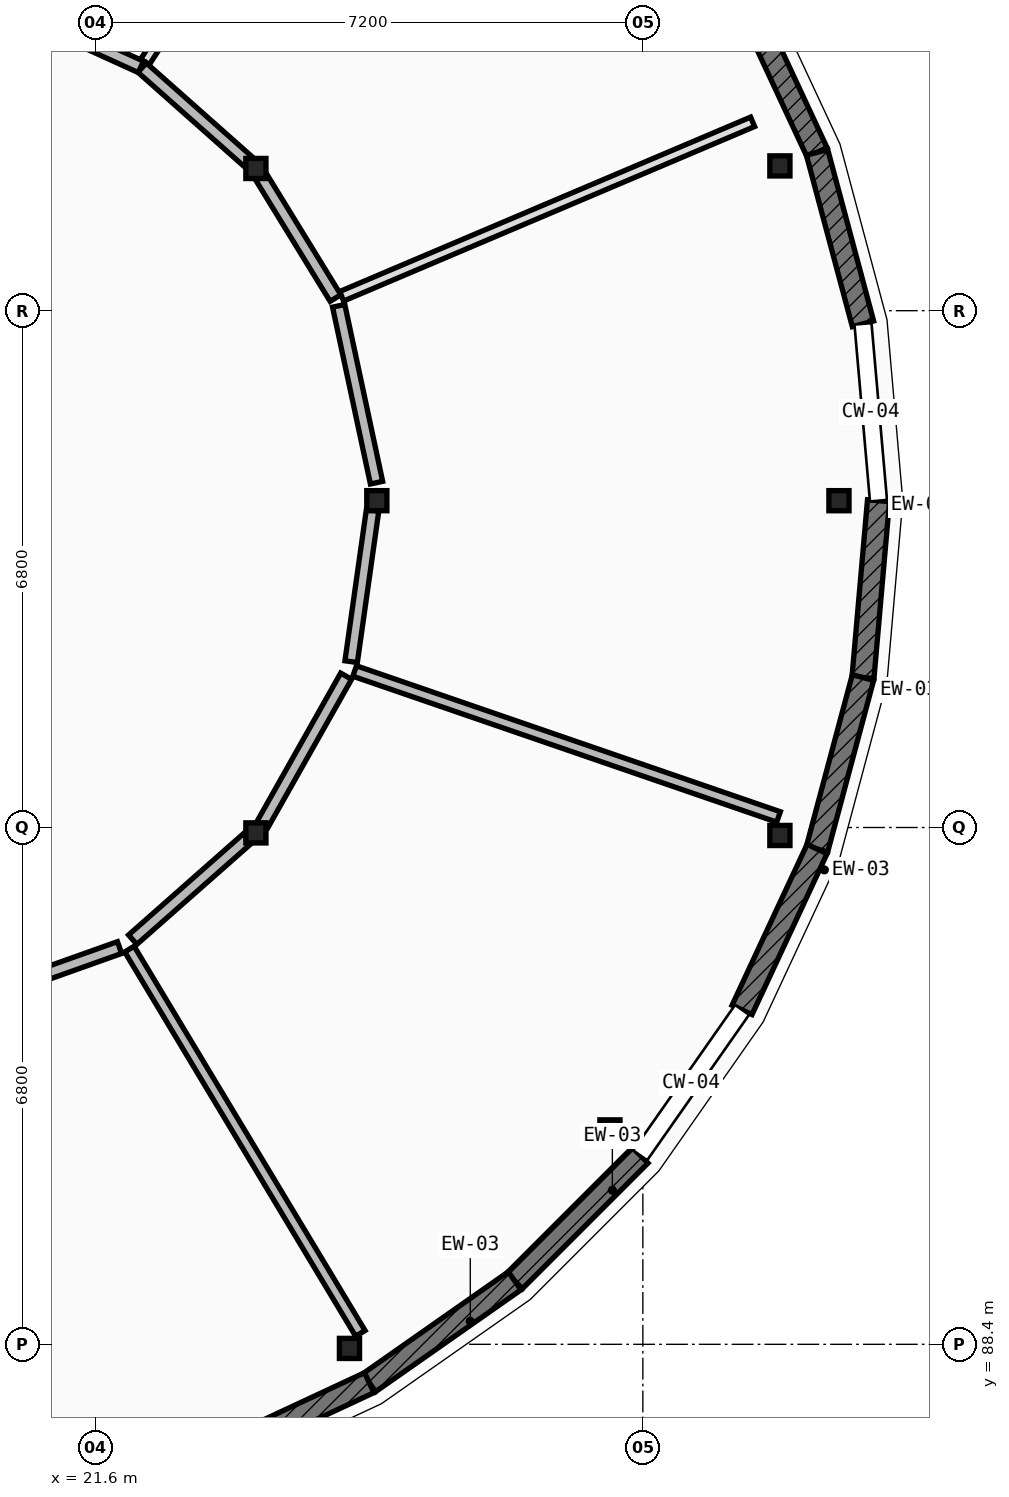
"""IFC4 building model, lengths in metres.
Left out: names, types, materials, properties, quantities, classifications, styles, units other than length and angle.
Written with IfcOpenShell. Run it as: python <this file> out.ifc"""

import sys

from ifc_helpers import new_model, si_unit, direction, frame, frame_2d, origin, origin_2d, place, context, subcontext, project, spatial, rectangle, extrude, element, fill, save


model = new_model("IFC4")
c1 = context("Model", 3, precision=1e-05, world=origin(), true_north=direction((0.0, 1.0)))
c2 = subcontext(c1, "Body", "Model", "MODEL_VIEW")
j1 = project(units=[si_unit("LENGTHUNIT", "METRE"), si_unit("PLANEANGLEUNIT", "RADIAN")], contexts=[c1])
p1 = place(None, origin())
s1 = spatial("IfcSite", under=j1, at=p1, CompositionType="ELEMENT")
p2 = place(p1, origin())
s2 = spatial("IfcBuilding", under=s1, at=p2, CompositionType="ELEMENT")
p3 = place(p2, frame((0.0, 0.0, 17.15)))
s3 = spatial("IfcBuildingStorey", under=s2, at=p3, CompositionType="ELEMENT", Elevation=17.15)
for number, where, z_axis, x_axis in (
    (1, (31.38, 99.5, 0.0), (0.0, 0.0, 1.0), (1.0, 0.0, 0.0)),
    (2, (30.603, 103.905, 0.0), (0.0, 0.0, 1.0), (1.0, 0.0, 0.0)),
    (3, (24.94, 88.346, 0.0), (0.0, 0.0, 1.0), (1.0, 0.0, 0.0)),
    (4, (28.367, 91.221, 0.0), (0.0, 0.0, 1.0), (1.0, 0.0, 0.0)),
    (5, (30.603, 95.095, 0.0), (0.0, 0.0, 1.0), (1.0, 0.0, 0.0)),
    (6, (25.3, 99.5, 0.0), (0.0, 0.0, 1.0), (1.0, 0.0, 0.0)),
    (7, (23.709, 103.871, 0.0), (0.0, 0.0, 1.0), (1.0, 0.0, 0.0)),
    (8, (23.709, 95.129, 0.0), (0.0, 0.0, 1.0), (1.0, 0.0, 0.0)),
):
    element("IfcColumn", number, at=place(p3, frame(where, z_axis=z_axis, x_axis=x_axis)), inside=s3, PredefinedType="COLUMN", context=c2, shape_type="SweptSolid", body=[
        extrude(rectangle(XDim=0.265, YDim=0.265, at=origin_2d()), origin(), (0.0, 0.0, 1.0), 4.2),
    ])
p4 = place(p3, frame((31.9, 99.5, 0.0), z_axis=(0.0, 0.0, 1.0), x_axis=(-0.087274565792, -0.996184295282, 0.0)))
e9 = element("IfcWall", 9, at=p4, inside=s3, PredefinedType="ELEMENTEDWALL", context=c2, shape_type="SweptSolid", body=[
    extrude(rectangle(XDim=2.336, YDim=0.29, at=frame_2d((1.168, 0.0))), origin(), (0.0, 0.0, 1.0), 3.369),
])
p5 = place(p4, frame((0.568, 0.0, 0.85)))
e10 = element("IfcOpeningElement", 10, at=p5, cuts=e9, PredefinedType="OPENING", context=c2, shape_type="SweptSolid", body=[
    extrude(rectangle(XDim=1.2, YDim=2.25, at=frame_2d((0.6, 1.125))), frame((0.0, 0.155, 0.0), z_axis=(0.0, -1.0, 0.0), x_axis=(1.0, 0.0, 0.0)), (0.0, 0.0, 1.0), 0.31),
])
p6 = place(p3, frame((31.696, 97.173, 0.0), z_axis=(0.0, 0.0, 1.0), x_axis=(-0.258612423585, -0.965981166673, 0.0)))
e11 = element("IfcWall", 11, at=p6, inside=s3, PredefinedType="ELEMENTEDWALL", context=c2, shape_type="SweptSolid", body=[
    extrude(rectangle(XDim=2.335, YDim=0.29, at=frame_2d((1.168, 0.0))), origin(), (0.0, 0.0, 1.0), 3.369),
])
p7 = place(p6, frame((0.558, 0.0, 0.85)))
e12 = element("IfcOpeningElement", 12, at=p7, cuts=e11, PredefinedType="OPENING", context=c2, shape_type="SweptSolid", body=[
    extrude(rectangle(XDim=1.22, YDim=1.5, at=frame_2d((0.61, 0.75))), frame((0.0, 0.155, 0.0), z_axis=(0.0, -1.0, 0.0), x_axis=(1.0, 0.0, 0.0)), (0.0, 0.0, 1.0), 0.31),
])
p8 = place(p3, frame((31.092, 94.917, 0.0), z_axis=(0.0, 0.0, 1.0), x_axis=(-0.422587894318, -0.906321946979, 0.0)))
e13 = element("IfcWall", 13, at=p8, inside=s3, PredefinedType="ELEMENTEDWALL", context=c2, shape_type="SweptSolid", body=[
    extrude(rectangle(XDim=2.336, YDim=0.29, at=frame_2d((1.168, 0.0))), origin(), (0.0, 0.0, 1.0), 3.369),
])
p9 = place(p8, frame((0.558, 0.0, 0.85)))
e14 = element("IfcOpeningElement", 14, at=p9, cuts=e13, PredefinedType="OPENING", context=c2, shape_type="SweptSolid", body=[
    extrude(rectangle(XDim=1.22, YDim=1.8, at=frame_2d((0.61, 0.9))), frame((0.0, 0.155, 0.0), z_axis=(0.0, -1.0, 0.0), x_axis=(1.0, 0.0, 0.0)), (0.0, 0.0, 1.0), 0.31),
])
p10 = place(p3, frame((28.765, 90.887, 0.0), z_axis=(0.0, 0.0, 1.0), x_axis=(-0.707106781187, -0.707106781187, 0.0)))
e15 = element("IfcWall", 15, at=p10, inside=s3, PredefinedType="ELEMENTEDWALL", context=c2, shape_type="SweptSolid", body=[
    extrude(rectangle(XDim=2.336, YDim=0.29, at=frame_2d((1.168, 0.0))), origin(), (0.0, 0.0, 1.0), 3.369),
])
p11 = place(p10, frame((0.543, 0.0, 0.85)))
e16 = element("IfcOpeningElement", 16, at=p11, cuts=e15, PredefinedType="OPENING", context=c2, shape_type="SweptSolid", body=[
    extrude(rectangle(XDim=1.25, YDim=1.5, at=frame_2d((0.625, 0.75))), frame((0.0, 0.155, 0.0), z_axis=(0.0, -1.0, 0.0), x_axis=(1.0, 0.0, 0.0)), (0.0, 0.0, 1.0), 0.31),
])
p12 = place(p3, frame((27.113, 89.235, 0.0), z_axis=(0.0, 0.0, 1.0), x_axis=(-0.819045278347, -0.573728883722, 0.0)))
e17 = element("IfcWall", 17, at=p12, inside=s3, PredefinedType="ELEMENTEDWALL", context=c2, shape_type="SweptSolid", body=[
    extrude(rectangle(XDim=2.336, YDim=0.29, at=frame_2d((1.168, 0.0))), origin(), (0.0, 0.0, 1.0), 3.369),
])
p13 = place(p12, frame((0.543, 0.0, 0.85)))
e18 = element("IfcOpeningElement", 18, at=p13, cuts=e17, PredefinedType="OPENING", context=c2, shape_type="SweptSolid", body=[
    extrude(rectangle(XDim=1.25, YDim=1.8, at=frame_2d((0.625, 0.9))), frame((0.0, 0.155, 0.0), z_axis=(0.0, -1.0, 0.0), x_axis=(1.0, 0.0, 0.0)), (0.0, 0.0, 1.0), 0.31),
])
p14 = place(p3, frame((25.2, 87.895, 0.0), z_axis=(0.0, 0.0, 1.0), x_axis=(-0.906321946979, -0.422587894318, 0.0)))
e19 = element("IfcWall", 19, at=p14, inside=s3, PredefinedType="ELEMENTEDWALL", context=c2, shape_type="SweptSolid", body=[
    extrude(rectangle(XDim=2.336, YDim=0.29, at=frame_2d((1.168, 0.0))), origin(), (0.0, 0.0, 1.0), 3.369),
])
p15 = place(p14, frame((0.543, 0.0, 0.85)))
e20 = element("IfcOpeningElement", 20, at=p15, cuts=e19, PredefinedType="OPENING", context=c2, shape_type="SweptSolid", body=[
    extrude(rectangle(XDim=1.25, YDim=2.1, at=frame_2d((0.625, 1.05))), frame((0.0, 0.155, 0.0), z_axis=(0.0, -1.0, 0.0), x_axis=(1.0, 0.0, 0.0)), (0.0, 0.0, 1.0), 0.31),
])
p16 = place(p3, frame((30.105, 106.2, 0.0), z_axis=(0.0, 0.0, 1.0), x_axis=(0.422587894318, -0.906321946979, 0.0)))
e21 = element("IfcWall", 21, at=p16, inside=s3, PredefinedType="ELEMENTEDWALL", context=c2, shape_type="SweptSolid", body=[
    extrude(rectangle(XDim=2.336, YDim=0.29, at=frame_2d((1.168, 0.0))), origin(), (0.0, 0.0, 1.0), 3.369),
])
p17 = place(p16, frame((0.443, 0.0, 0.85)))
e22 = element("IfcOpeningElement", 22, at=p17, cuts=e21, PredefinedType="OPENING", context=c2, shape_type="SweptSolid", body=[
    extrude(rectangle(XDim=1.45, YDim=2.05, at=frame_2d((0.725, 1.025))), frame((0.0, 0.155, 0.0), z_axis=(0.0, -1.0, 0.0), x_axis=(1.0, 0.0, 0.0)), (0.0, 0.0, 1.0), 0.31),
])
p18 = place(p3, frame((31.092, 104.083, 0.0), z_axis=(0.0, 0.0, 1.0), x_axis=(0.258612423585, -0.965981166673, 0.0)))
e23 = element("IfcWall", 23, at=p18, inside=s3, PredefinedType="ELEMENTEDWALL", context=c2, shape_type="SweptSolid", body=[
    extrude(rectangle(XDim=2.335, YDim=0.29, at=frame_2d((1.168, 0.0))), origin(), (0.0, 0.0, 1.0), 3.369),
])
p19 = place(p18, frame((0.418, 0.0, 0.85)))
e24 = element("IfcOpeningElement", 24, at=p19, cuts=e23, PredefinedType="OPENING", context=c2, shape_type="SweptSolid", body=[
    extrude(rectangle(XDim=1.5, YDim=1.3, at=frame_2d((0.75, 0.65))), frame((0.0, 0.155, 0.0), z_axis=(0.0, -1.0, 0.0), x_axis=(1.0, 0.0, 0.0)), (0.0, 0.0, 1.0), 0.31),
])
p20 = place(p3, frame((22.045, 93.6, 0.0), z_axis=(0.0, 0.0, 1.0), x_axis=(0.515043444679, -0.857164074197, 0.0)))
e25 = element("IfcWall", 25, at=p20, inside=s3, PredefinedType="PARTITIONING", context=c2, shape_type="SweptSolid", body=[
    extrude(rectangle(XDim=5.899, YDim=0.145, at=frame_2d((2.949, 0.0))), origin(), (0.0, 0.0, 1.0), 3.344),
])
p21 = place(p3, frame((25.008, 97.259, 0.0), z_axis=(0.0, 0.0, 1.0), x_axis=(0.945537377012, -0.325513546068, 0.0)))
e26 = element("IfcWall", 26, at=p21, inside=s3, PredefinedType="PARTITIONING", context=c2, shape_type="SweptSolid", body=[
    extrude(rectangle(XDim=5.898, YDim=0.145, at=frame_2d((2.949, 0.0))), origin(), (0.0, 0.0, 1.0), 3.344),
])
p22 = place(p3, frame((24.836, 102.189, 0.0), z_axis=(0.0, 0.0, 1.0), x_axis=(0.920468107404, 0.390817685438, 0.0)))
e27 = element("IfcWall", 27, at=p22, inside=s3, PredefinedType="PLUMBINGWALL", context=c2, shape_type="SweptSolid", body=[
    extrude(rectangle(XDim=5.875, YDim=0.135, at=frame_2d((2.938, 0.0))), origin(), (0.0, 0.0, 1.0), 3.344),
])
p23 = place(p3, frame((22.249, 105.273, 0.0), z_axis=(0.0, 0.0, 1.0), x_axis=(0.544677189284, 0.838645789039, 0.0)))
e28 = element("IfcWall", 28, at=p23, inside=s3, PredefinedType="PLUMBINGWALL", context=c2, shape_type="SweptSolid", body=[
    extrude(rectangle(XDim=5.875, YDim=0.135, at=frame_2d((2.938, 0.0))), origin(), (0.0, 0.0, 1.0), 3.344),
])
p24 = place(p3, frame((19.802, 92.868, 0.0), z_axis=(0.0, 0.0, 1.0), x_axis=(0.942088643155, 0.335363964132, 0.0)))
e29 = element("IfcWall", 29, at=p24, inside=s3, PredefinedType="PARTITIONING", context=c2, shape_type="SweptSolid", body=[
    extrude(rectangle(XDim=2.243, YDim=0.165, at=frame_2d((1.122, 0.0))), origin(), (0.0, 0.0, 1.0), 3.344),
])
p25 = place(p3, frame((22.088, 93.724, 0.0), z_axis=(0.0, 0.0, 1.0), x_axis=(0.750064751016, 0.66136439977, 0.0)))
e30 = element("IfcWall", 30, at=p25, inside=s3, PredefinedType="PARTITIONING", context=c2, shape_type="SweptSolid", body=[
    extrude(rectangle(XDim=2.009, YDim=0.165, at=frame_2d((1.005, 0.0))), origin(), (0.0, 0.0, 1.0), 3.344),
])
p26 = place(p25, frame((0.424, 0.0, 0.0)))
e31 = element("IfcOpeningElement", 31, at=p26, cuts=e30, PredefinedType="OPENING", context=c2, shape_type="SweptSolid", body=[
    extrude(rectangle(XDim=1.16, YDim=2.18, at=frame_2d((0.58, 1.09))), frame((0.0, 0.093, 0.0), z_axis=(0.0, -1.0, 0.0), x_axis=(1.0, 0.0, 0.0)), (0.0, 0.0, 1.0), 0.185),
])
p27 = place(p3, frame((23.794, 95.237, 0.0), z_axis=(0.0, 0.0, 1.0), x_axis=(0.491278846753, 0.87100235059, 0.0)))
e32 = element("IfcWall", 32, at=p27, inside=s3, PredefinedType="PARTITIONING", context=c2, shape_type="SweptSolid", body=[
    extrude(rectangle(XDim=2.243, YDim=0.165, at=frame_2d((1.122, 0.0))), origin(), (0.0, 0.0, 1.0), 3.344),
])
p28 = place(p3, frame((24.962, 97.382, 0.0), z_axis=(0.0, 0.0, 1.0), x_axis=(0.140164013462, 0.990128299429, 0.0)))
e33 = element("IfcWall", 33, at=p28, inside=s3, PredefinedType="PARTITIONING", context=c2, shape_type="SweptSolid", body=[
    extrude(rectangle(XDim=2.012, YDim=0.165, at=frame_2d((1.006, 0.0))), origin(), (0.0, 0.0, 1.0), 3.344),
])
p29 = place(p28, frame((0.396, 0.0, 0.0)))
e34 = element("IfcOpeningElement", 34, at=p29, cuts=e33, PredefinedType="OPENING", context=c2, shape_type="SweptSolid", body=[
    extrude(rectangle(XDim=1.22, YDim=2.18, at=frame_2d((0.61, 1.09))), frame((0.0, 0.093, 0.0), z_axis=(0.0, -1.0, 0.0), x_axis=(1.0, 0.0, 0.0)), (0.0, 0.0, 1.0), 0.185),
])
p30 = place(p3, frame((25.296, 99.737, 0.0), z_axis=(0.0, 0.0, 1.0), x_axis=(-0.209199758456, 0.977872926848, 0.0)))
e35 = element("IfcWall", 35, at=p30, inside=s3, PredefinedType="PARTITIONING", context=c2, shape_type="SweptSolid", body=[
    extrude(rectangle(XDim=2.38, YDim=0.165, at=frame_2d((1.19, 0.0))), origin(), (0.0, 0.0, 1.0), 3.344),
])
p31 = place(p3, frame((24.756, 102.166, 0.0), z_axis=(0.0, 0.0, 1.0), x_axis=(-0.523293079125, 0.852152775821, 0.0)))
e36 = element("IfcWall", 36, at=p31, inside=s3, PredefinedType="PARTITIONING", context=c2, shape_type="SweptSolid", body=[
    extrude(rectangle(XDim=1.863, YDim=0.165, at=frame_2d((0.932, 0.0))), origin(), (0.0, 0.0, 1.0), 3.344),
])
p32 = place(p31, frame((0.482, 0.0, 0.0)))
e37 = element("IfcOpeningElement", 37, at=p32, cuts=e36, PredefinedType="OPENING", context=c2, shape_type="SweptSolid", body=[
    extrude(rectangle(XDim=0.9, YDim=2.1, at=frame_2d((0.45, 1.05))), frame((0.0, 0.093, 0.0), z_axis=(0.0, -1.0, 0.0), x_axis=(1.0, 0.0, 0.0)), (0.0, 0.0, 1.0), 0.185),
])
p33 = place(p3, frame((23.606, 103.962, 0.0), z_axis=(0.0, 0.0, 1.0), x_axis=(-0.748225706364, 0.66344426468, 0.0)))
e38 = element("IfcWall", 38, at=p33, inside=s3, PredefinedType="PARTITIONING", context=c2, shape_type="SweptSolid", body=[
    extrude(rectangle(XDim=1.863, YDim=0.165, at=frame_2d((0.932, 0.0))), origin(), (0.0, 0.0, 1.0), 3.344),
])
p34 = place(p3, frame((22.196, 105.208, 0.0), z_axis=(0.0, 0.0, 1.0), x_axis=(-0.910195152859, 0.414179651495, 0.0)))
e39 = element("IfcWall", 39, at=p34, inside=s3, PredefinedType="PARTITIONING", context=c2, shape_type="SweptSolid", body=[
    extrude(rectangle(XDim=2.002, YDim=0.165, at=frame_2d((1.001, 0.0))), origin(), (0.0, 0.0, 1.0), 3.344),
])
p35 = place(p34, frame((0.53, 0.0, 0.0)))
e40 = element("IfcOpeningElement", 40, at=p35, cuts=e39, PredefinedType="OPENING", context=c2, shape_type="SweptSolid", body=[
    extrude(rectangle(XDim=0.94, YDim=2.1, at=frame_2d((0.47, 1.05))), frame((0.0, 0.093, 0.0), z_axis=(0.0, -1.0, 0.0), x_axis=(1.0, 0.0, 0.0)), (0.0, 0.0, 1.0), 0.185),
])
p36 = place(p5, origin())
e41 = element("IfcWindow", 41, at=p36, inside=s3, PartitioningType="SINGLE_PANEL", PredefinedType="WINDOW", context=c2, shape_type="SweptSolid", body=[
    extrude(rectangle(XDim=1.2, YDim=2.25, at=frame_2d((0.6, 1.125))), frame((0.0, 0.03, 0.0), z_axis=(0.0, -1.0, 0.0), x_axis=(1.0, 0.0, 0.0)), (0.0, 0.0, 1.0), 0.06),
])
fill(e10, e41)
p37 = place(p7, origin())
e42 = element("IfcWindow", 42, at=p37, inside=s3, PartitioningType="SINGLE_PANEL", PredefinedType="WINDOW", context=c2, shape_type="SweptSolid", body=[
    extrude(rectangle(XDim=1.22, YDim=1.5, at=frame_2d((0.61, 0.75))), frame((0.0, 0.03, 0.0), z_axis=(0.0, -1.0, 0.0), x_axis=(1.0, 0.0, 0.0)), (0.0, 0.0, 1.0), 0.06),
])
fill(e12, e42)
p38 = place(p9, origin())
e43 = element("IfcWindow", 43, at=p38, inside=s3, PartitioningType="SINGLE_PANEL", PredefinedType="WINDOW", context=c2, shape_type="SweptSolid", body=[
    extrude(rectangle(XDim=1.22, YDim=1.8, at=frame_2d((0.61, 0.9))), frame((0.0, 0.03, 0.0), z_axis=(0.0, -1.0, 0.0), x_axis=(1.0, 0.0, 0.0)), (0.0, 0.0, 1.0), 0.06),
])
fill(e14, e43)
p39 = place(p11, origin())
e44 = element("IfcWindow", 44, at=p39, inside=s3, PartitioningType="SINGLE_PANEL", PredefinedType="WINDOW", context=c2, shape_type="SweptSolid", body=[
    extrude(rectangle(XDim=1.25, YDim=1.5, at=frame_2d((0.625, 0.75))), frame((0.0, 0.03, 0.0), z_axis=(0.0, -1.0, 0.0), x_axis=(1.0, 0.0, 0.0)), (0.0, 0.0, 1.0), 0.06),
])
fill(e16, e44)
p40 = place(p13, origin())
e45 = element("IfcWindow", 45, at=p40, inside=s3, PartitioningType="SINGLE_PANEL", PredefinedType="WINDOW", context=c2, shape_type="SweptSolid", body=[
    extrude(rectangle(XDim=1.25, YDim=1.8, at=frame_2d((0.625, 0.9))), frame((0.0, 0.03, 0.0), z_axis=(0.0, -1.0, 0.0), x_axis=(1.0, 0.0, 0.0)), (0.0, 0.0, 1.0), 0.06),
])
fill(e18, e45)
p41 = place(p15, origin())
e46 = element("IfcWindow", 46, at=p41, inside=s3, PartitioningType="SINGLE_PANEL", PredefinedType="WINDOW", context=c2, shape_type="SweptSolid", body=[
    extrude(rectangle(XDim=1.25, YDim=2.1, at=frame_2d((0.625, 1.05))), frame((0.0, 0.03, 0.0), z_axis=(0.0, -1.0, 0.0), x_axis=(1.0, 0.0, 0.0)), (0.0, 0.0, 1.0), 0.06),
])
fill(e20, e46)
p42 = place(p17, origin())
e47 = element("IfcWindow", 47, at=p42, inside=s3, PartitioningType="SINGLE_PANEL", PredefinedType="WINDOW", context=c2, shape_type="SweptSolid", body=[
    extrude(rectangle(XDim=1.45, YDim=2.05, at=frame_2d((0.725, 1.025))), frame((0.0, 0.03, 0.0), z_axis=(0.0, -1.0, 0.0), x_axis=(1.0, 0.0, 0.0)), (0.0, 0.0, 1.0), 0.06),
])
fill(e22, e47)
p43 = place(p19, origin())
e48 = element("IfcWindow", 48, at=p43, inside=s3, PartitioningType="SINGLE_PANEL", PredefinedType="WINDOW", context=c2, shape_type="SweptSolid", body=[
    extrude(rectangle(XDim=1.5, YDim=1.3, at=frame_2d((0.75, 0.65))), frame((0.0, 0.03, 0.0), z_axis=(0.0, -1.0, 0.0), x_axis=(1.0, 0.0, 0.0)), (0.0, 0.0, 1.0), 0.06),
])
fill(e24, e48)
p44 = place(p26, origin())
e49 = element("IfcDoor", 49, at=p44, inside=s3, OperationType="SINGLE_SWING_LEFT", PredefinedType="DOOR", context=c2, shape_type="SweptSolid", body=[
    extrude(rectangle(XDim=1.16, YDim=2.18, at=frame_2d((0.58, 1.09))), frame((0.0, 0.025, 0.0), z_axis=(0.0, -1.0, 0.0), x_axis=(1.0, 0.0, 0.0)), (0.0, 0.0, 1.0), 0.05),
])
fill(e31, e49)
p45 = place(p29, origin())
e50 = element("IfcDoor", 50, at=p45, inside=s3, OperationType="SINGLE_SWING_RIGHT", PredefinedType="DOOR", context=c2, shape_type="SweptSolid", body=[
    extrude(rectangle(XDim=1.22, YDim=2.18, at=frame_2d((0.61, 1.09))), frame((0.0, 0.025, 0.0), z_axis=(0.0, -1.0, 0.0), x_axis=(1.0, 0.0, 0.0)), (0.0, 0.0, 1.0), 0.05),
])
fill(e34, e50)
p46 = place(p32, origin())
e51 = element("IfcDoor", 51, at=p46, inside=s3, OperationType="SINGLE_SWING_LEFT", PredefinedType="DOOR", context=c2, shape_type="SweptSolid", body=[
    extrude(rectangle(XDim=0.9, YDim=2.1, at=frame_2d((0.45, 1.05))), frame((0.0, 0.025, 0.0), z_axis=(0.0, -1.0, 0.0), x_axis=(1.0, 0.0, 0.0)), (0.0, 0.0, 1.0), 0.05),
])
fill(e37, e51)
save(model, sys.argv[1])
